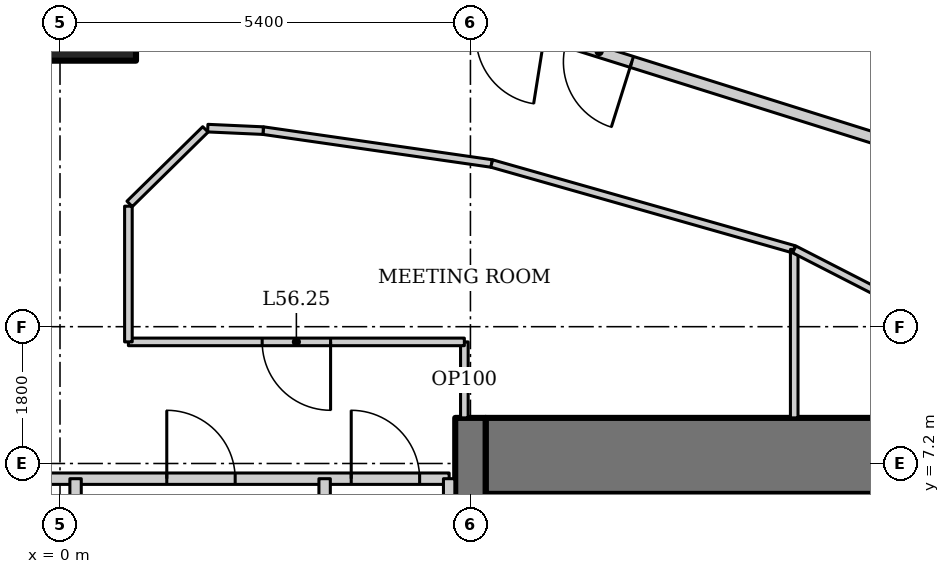
"""IFC4 building model, lengths in metres.
Left out: names, types, materials, properties, quantities, classifications, styles, units other than length and angle.
Written with IfcOpenShell. Run it as: python <this file> out.ifc"""

import sys

from ifc_helpers import new_model, si_unit, direction, frame, frame_2d, origin, origin_2d, place, context, subcontext, project, spatial, rectangle, hollow_rectangle, extrude, element, fill, save


model = new_model("IFC4")
c1 = context("Model", 3, precision=1e-05, world=origin(), true_north=direction((0.0, 1.0)))
c2 = subcontext(c1, "Body", "Model", "MODEL_VIEW")
j1 = project(units=[si_unit("LENGTHUNIT", "METRE"), si_unit("PLANEANGLEUNIT", "RADIAN")], contexts=[c1])
p1 = place(None, origin())
s1 = spatial("IfcSite", under=j1, at=p1, CompositionType="ELEMENT")
p2 = place(p1, origin())
s2 = spatial("IfcBuilding", under=s1, at=p2, CompositionType="ELEMENT")
p3 = place(p2, frame((0.0, 0.0, 241.0)))
s3 = spatial("IfcBuildingStorey", under=s2, at=p3, CompositionType="ELEMENT", Elevation=241.0)
p4 = place(p3, frame((0.0, 13.5, 0.0), z_axis=(0.0, 0.0, 1.0), x_axis=(1.0, 0.0, 0.0)))
e1 = element("IfcColumn", 1, at=p4, inside=s3, PredefinedType="COLUMN", context=c2, shape_type="SweptSolid", body=[
    extrude(hollow_rectangle(XDim=2.0, YDim=2.0, WallThickness=0.17, at=origin_2d()), origin(), (0.0, 0.0, 1.0), 4.2),
])
p5 = place(p3, frame((12.2, 7.3, 0.0), z_axis=(0.0, 0.0, 1.0), x_axis=(-1.0, 0.0, 0.0)))
e2 = element("IfcWall", 2, at=p5, inside=s3, PredefinedType="SHEAR", context=c2, shape_type="SweptSolid", body=[
    extrude(rectangle(XDim=6.6, YDim=1.0, at=frame_2d((3.3, 0.0))), origin(), (0.0, 0.0, 1.0), 4.2),
])
p6 = place(p3, frame((5.4, -6.8, 0.0), z_axis=(0.0, 0.0, 1.0), x_axis=(0.0, 1.0, 0.0)))
e3 = element("IfcWall", 3, at=p6, inside=s3, PredefinedType="SHEAR", context=c2, shape_type="SweptSolid", body=[
    extrude(rectangle(XDim=14.6, YDim=0.4, at=frame_2d((7.3, 0.0))), origin(), (0.0, 0.0, 1.0), 4.2),
])
p7 = place(p6, frame((5.9, 0.0, 0.0)))
e4 = element("IfcOpeningElement", 4, at=p7, cuts=e3, PredefinedType="OPENING", context=c2, shape_type="SweptSolid", body=[
    extrude(rectangle(XDim=1.8, YDim=2.1, at=frame_2d((0.9, 1.05))), frame((0.0, 0.21, 0.0), z_axis=(0.0, -1.0, 0.0), x_axis=(1.0, 0.0, 0.0)), (0.0, 0.0, 1.0), 0.42),
])
p8 = place(p3, frame((11.001, 11.392, 0.0), z_axis=(0.0, 0.0, 1.0), x_axis=(-0.954031103669, 0.299707612903, 0.0)))
e5 = element("IfcWall", 5, at=p8, inside=s3, PredefinedType="PARTITIONING", context=c2, shape_type="SweptSolid", body=[
    extrude(rectangle(XDim=4.695, YDim=0.15, at=frame_2d((2.348, 0.0))), origin(), (0.0, 0.0, 1.0), 4.05),
])
p9 = place(p8, frame((3.645, 0.0, 0.0)))
e6 = element("IfcOpeningElement", 6, at=p9, cuts=e5, PredefinedType="OPENING", context=c2, shape_type="SweptSolid", body=[
    extrude(rectangle(XDim=0.9, YDim=2.1, at=frame_2d((0.45, 1.05))), frame((0.0, 0.085, 0.0), z_axis=(0.0, -1.0, 0.0), x_axis=(1.0, 0.0, 0.0)), (0.0, 0.0, 1.0), 0.17),
])
p10 = place(p3, frame((-5.12, 7.0, 0.0), z_axis=(0.0, 0.0, 1.0), x_axis=(1.0, 0.0, 0.0)))
e7 = element("IfcWall", 7, at=p10, inside=s3, PredefinedType="SOLIDWALL", context=c2, shape_type="SweptSolid", body=[
    extrude(rectangle(XDim=10.24, YDim=0.15, at=frame_2d((5.12, 0.0))), origin(), (0.0, 0.0, 1.0), 4.05),
])
p11 = place(p10, frame((0.5, 0.0, 0.0)))
e8 = element("IfcOpeningElement", 8, at=p11, cuts=e7, PredefinedType="OPENING", context=c2, shape_type="SweptSolid", body=[
    extrude(rectangle(XDim=1.0, YDim=2.1, at=frame_2d((0.5, 1.05))), frame((0.0, 0.085, 0.0), z_axis=(0.0, -1.0, 0.0), x_axis=(1.0, 0.0, 0.0)), (0.0, 0.0, 1.0), 0.17),
])
p12 = place(p10, frame((3.248, 0.0, 0.0)))
e9 = element("IfcOpeningElement", 9, at=p12, cuts=e7, PredefinedType="OPENING", context=c2, shape_type="SweptSolid", body=[
    extrude(rectangle(XDim=0.9, YDim=2.1, at=frame_2d((0.45, 1.05))), frame((0.0, 0.085, 0.0), z_axis=(0.0, -1.0, 0.0), x_axis=(1.0, 0.0, 0.0)), (0.0, 0.0, 1.0), 0.17),
])
p13 = place(p10, frame((6.525, 0.0, 0.0)))
e10 = element("IfcOpeningElement", 10, at=p13, cuts=e7, PredefinedType="OPENING", context=c2, shape_type="SweptSolid", body=[
    extrude(rectangle(XDim=0.9, YDim=2.1, at=frame_2d((0.45, 1.05))), frame((0.0, 0.085, 0.0), z_axis=(0.0, -1.0, 0.0), x_axis=(1.0, 0.0, 0.0)), (0.0, 0.0, 1.0), 0.17),
])
p14 = place(p10, frame((8.952, 0.0, 0.0)))
e11 = element("IfcOpeningElement", 11, at=p14, cuts=e7, PredefinedType="OPENING", context=c2, shape_type="SweptSolid", body=[
    extrude(rectangle(XDim=0.9, YDim=2.1, at=frame_2d((0.45, 1.05))), frame((0.0, 0.085, 0.0), z_axis=(0.0, -1.0, 0.0), x_axis=(1.0, 0.0, 0.0)), (0.0, 0.0, 1.0), 0.17),
])
for number, where, z_axis, x_axis in (
    (12, (5.12, 2.6, 0.0), (0.0, 0.0, 1.0), (0.0, 1.0, 0.0)),
    (13, (0.205, 2.6, 0.0), (0.0, 0.0, 1.0), (0.0, 1.0, 0.0)),
    (14, (3.482, 2.6, 0.0), (0.0, 0.0, 1.0), (0.0, 1.0, 0.0)),
):
    element("IfcWall", number, at=place(p3, frame(where, z_axis=z_axis, x_axis=x_axis)), inside=s3, PredefinedType="SOLIDWALL", context=c2, shape_type="SweptSolid", body=[
        extrude(rectangle(XDim=4.4, YDim=0.15, at=frame_2d((2.2, 0.0))), origin(), (0.0, 0.0, 1.0), 4.05),
    ])
p15 = place(p3, frame((5.32, 7.8, 0.0), z_axis=(0.0, 0.0, 1.0), x_axis=(0.0, 1.0, 0.0)))
e15 = element("IfcWall", 15, at=p15, inside=s3, PredefinedType="PARTITIONING", context=c2, shape_type="SweptSolid", body=[
    extrude(rectangle(XDim=1.0, YDim=0.1, at=frame_2d((0.5, 0.0))), origin(), (0.0, 0.0, 1.0), 4.05),
])
p16 = place(p3, frame((5.32, 8.8, 0.0), z_axis=(0.0, 0.0, 1.0), x_axis=(-1.0, 0.0, 0.0)))
e16 = element("IfcWall", 16, at=p16, inside=s3, PredefinedType="PARTITIONING", context=c2, shape_type="SweptSolid", body=[
    extrude(rectangle(XDim=4.42, YDim=0.1, at=frame_2d((2.21, 0.0))), origin(), (0.0, 0.0, 1.0), 4.05),
])
p17 = place(p16, frame((1.76, 0.0, 0.0)))
e17 = element("IfcOpeningElement", 17, at=p17, cuts=e16, PredefinedType="OPENING", context=c2, shape_type="SweptSolid", body=[
    extrude(rectangle(XDim=0.9, YDim=2.1, at=frame_2d((0.45, 1.05))), frame((0.0, 0.06, 0.0), z_axis=(0.0, -1.0, 0.0), x_axis=(1.0, 0.0, 0.0)), (0.0, 0.0, 1.0), 0.12),
])
p18 = place(p3, frame((2.673, 11.58, 0.0), z_axis=(0.0, 0.0, 1.0), x_axis=(0.989805921373, -0.142422744025, 0.0)))
e18 = element("IfcWall", 18, at=p18, inside=s3, PredefinedType="PARTITIONING", context=c2, shape_type="SweptSolid", body=[
    extrude(rectangle(XDim=3.038, YDim=0.1, at=frame_2d((1.519, 0.0))), origin(), (0.0, 0.0, 1.0), 4.05),
])
p19 = place(p3, frame((5.68, 11.147, 0.0), z_axis=(0.0, 0.0, 1.0), x_axis=(0.961970251804, -0.27315423234, 0.0)))
e19 = element("IfcWall", 19, at=p19, inside=s3, PredefinedType="PARTITIONING", context=c2, shape_type="SweptSolid", body=[
    extrude(rectangle(XDim=4.137, YDim=0.1, at=frame_2d((2.069, 0.0))), origin(), (0.0, 0.0, 1.0), 4.05),
])
p20 = place(p3, frame((9.66, 10.017, 0.0), z_axis=(0.0, 0.0, 1.0), x_axis=(0.0, -1.0, 0.0)))
e20 = element("IfcWall", 20, at=p20, inside=s3, PredefinedType="PARTITIONING", context=c2, shape_type="SweptSolid", body=[
    extrude(rectangle(XDim=2.217, YDim=0.1, at=frame_2d((1.108, 0.0))), origin(), (0.0, 0.0, 1.0), 4.05),
])
p21 = place(p3, frame((0.9, 8.8, 0.0), z_axis=(0.0, 0.0, 1.0), x_axis=(0.0, 1.0, 0.0)))
e21 = element("IfcWall", 21, at=p21, inside=s3, PredefinedType="PARTITIONING", context=c2, shape_type="SweptSolid", body=[
    extrude(rectangle(XDim=1.785, YDim=0.1, at=frame_2d((0.893, 0.0))), origin(), (0.0, 0.0, 1.0), 4.05),
])
p22 = place(p3, frame((1.944, 11.613, 0.0), z_axis=(0.0, 0.0, 1.0), x_axis=(0.99899525873, -0.04481599085, 0.0)))
e22 = element("IfcWall", 22, at=p22, inside=s3, PredefinedType="PARTITIONING", context=c2, shape_type="SweptSolid", body=[
    extrude(rectangle(XDim=0.73, YDim=0.1, at=frame_2d((0.365, 0.0))), origin(), (0.0, 0.0, 1.0), 4.05),
])
p23 = place(p3, frame((1.913, 11.596, 0.0), z_axis=(0.0, 0.0, 1.0), x_axis=(-0.71318945388, -0.70097132814, 0.0)))
e23 = element("IfcWall", 23, at=p23, inside=s3, PredefinedType="PARTITIONING", context=c2, shape_type="SweptSolid", body=[
    extrude(rectangle(XDim=1.399, YDim=0.1, at=frame_2d((0.699, 0.0))), origin(), (0.0, 0.0, 1.0), 4.05),
])
p24 = place(p3, frame((9.66, 10.017, 0.0), z_axis=(0.0, 0.0, 1.0), x_axis=(0.889833724874, -0.456284935185, 0.0)))
e24 = element("IfcWall", 24, at=p24, inside=s3, PredefinedType="PARTITIONING", context=c2, shape_type="SweptSolid", body=[
    extrude(rectangle(XDim=4.22, YDim=0.1, at=frame_2d((2.11, 0.0))), origin(), (0.0, 0.0, 1.0), 4.05),
])
p25 = place(p13, origin())
e25 = element("IfcDoor", 25, at=p25, inside=s3, OperationType="SINGLE_SWING_LEFT", PredefinedType="DOOR", context=c2, shape_type="SweptSolid", body=[
    extrude(rectangle(XDim=0.9, YDim=2.1, at=frame_2d((0.45, 1.05))), frame((0.0, 0.025, 0.0), z_axis=(0.0, -1.0, 0.0), x_axis=(1.0, 0.0, 0.0)), (0.0, 0.0, 1.0), 0.05),
])
fill(e10, e25)
p26 = place(p14, origin())
e26 = element("IfcDoor", 26, at=p26, inside=s3, OperationType="SINGLE_SWING_LEFT", PredefinedType="DOOR", context=c2, shape_type="SweptSolid", body=[
    extrude(rectangle(XDim=0.9, YDim=2.1, at=frame_2d((0.45, 1.05))), frame((0.0, 0.025, 0.0), z_axis=(0.0, -1.0, 0.0), x_axis=(1.0, 0.0, 0.0)), (0.0, 0.0, 1.0), 0.05),
])
fill(e11, e26)
p27 = place(p17, origin())
e27 = element("IfcDoor", 27, at=p27, inside=s3, OperationType="SINGLE_SWING_LEFT", PredefinedType="DOOR", context=c2, shape_type="SweptSolid", body=[
    extrude(rectangle(XDim=0.9, YDim=2.1, at=frame_2d((0.45, 1.05))), frame((0.0, 0.025, 0.0), z_axis=(0.0, -1.0, 0.0), x_axis=(1.0, 0.0, 0.0)), (0.0, 0.0, 1.0), 0.05),
])
fill(e17, e27)
p28 = place(p9, origin())
e28 = element("IfcDoor", 28, at=p28, inside=s3, OperationType="SINGLE_SWING_LEFT", PredefinedType="DOOR", context=c2, shape_type="SweptSolid", body=[
    extrude(rectangle(XDim=0.9, YDim=2.1, at=frame_2d((0.45, 1.05))), frame((0.0, 0.025, 0.0), z_axis=(0.0, -1.0, 0.0), x_axis=(1.0, 0.0, 0.0)), (0.0, 0.0, 1.0), 0.05),
])
fill(e6, e28)
save(model, sys.argv[1])
